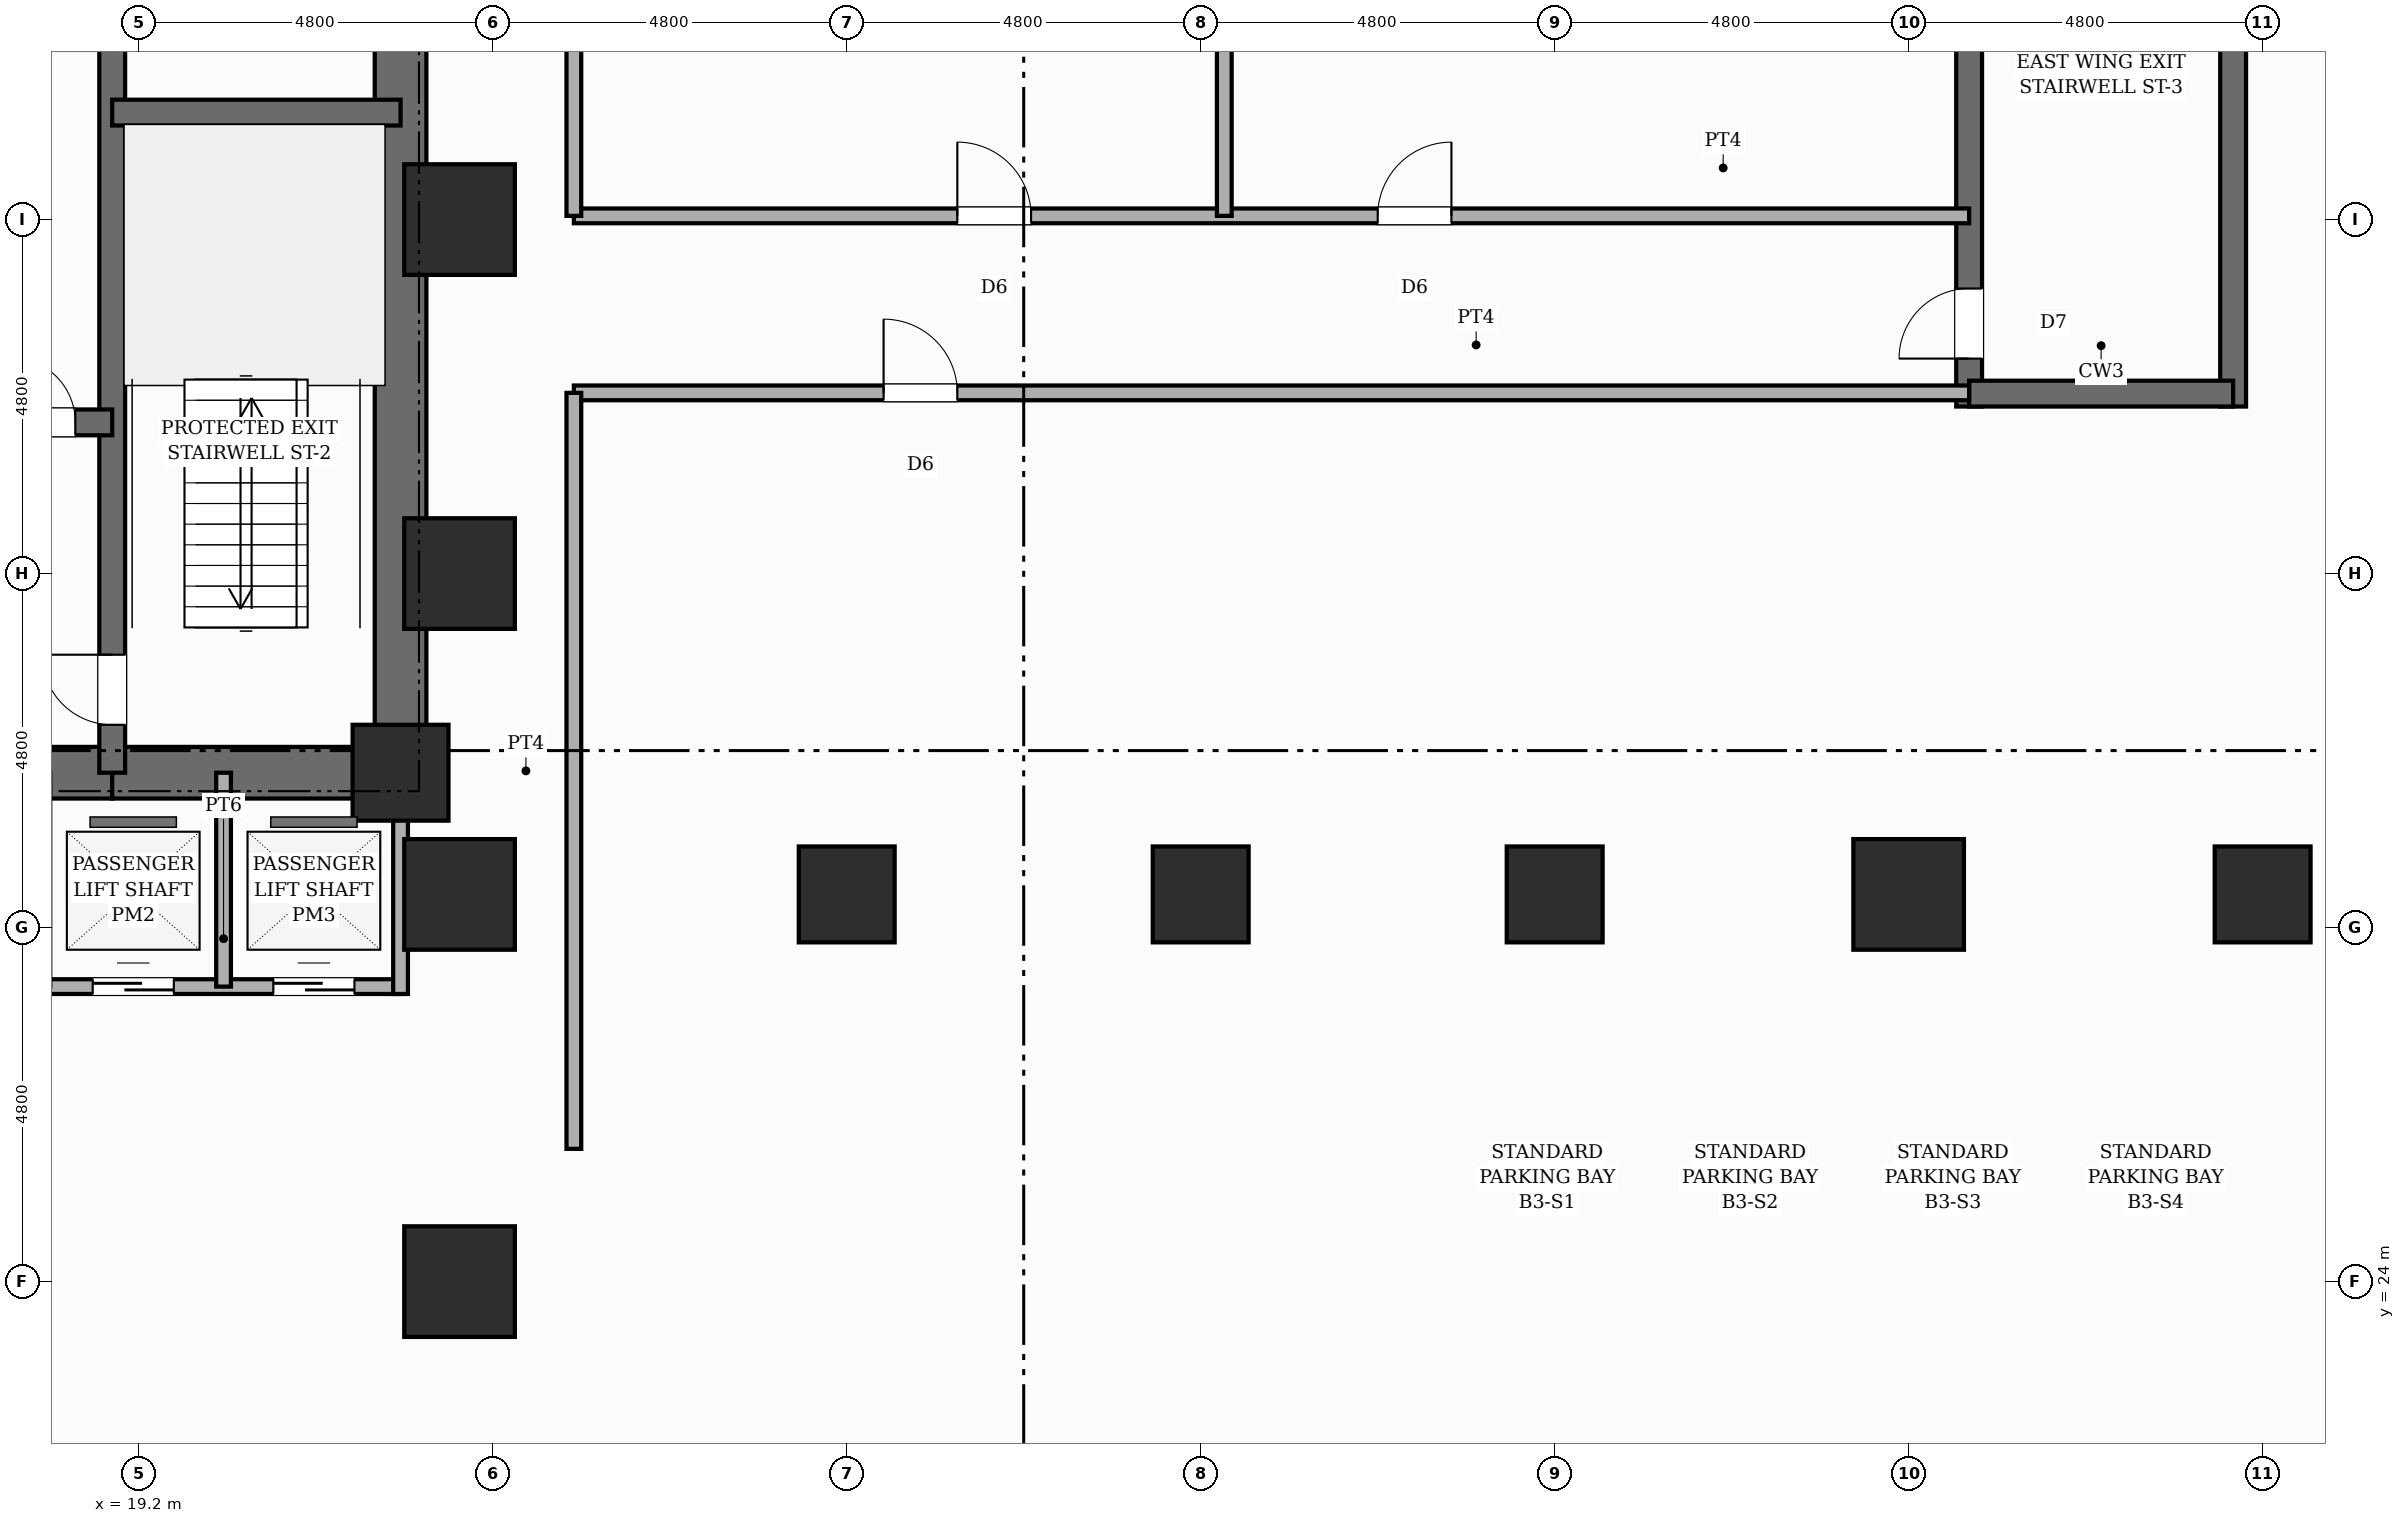
"""IFC4 building model, lengths in metres.
Left out: names, types, materials, properties, quantities, classifications, styles, units other than length and angle.
Written with IfcOpenShell. Run it as: python <this file> out.ifc"""

import sys

from ifc_helpers import new_model, si_unit, direction, frame, frame_2d, origin, origin_2d, place, context, subcontext, project, spatial, rectangle, extrude, element, fill, save


model = new_model("IFC4")
c1 = context("Model", 3, precision=1e-05, world=origin(), true_north=direction((0.0, 1.0)))
c2 = subcontext(c1, "Body", "Model", "MODEL_VIEW")
j1 = project(units=[si_unit("LENGTHUNIT", "METRE"), si_unit("PLANEANGLEUNIT", "RADIAN")], contexts=[c1])
p1 = place(None, origin())
s1 = spatial("IfcSite", under=j1, at=p1, CompositionType="ELEMENT")
p2 = place(p1, origin())
s2 = spatial("IfcBuilding", under=s1, at=p2, CompositionType="ELEMENT")
p3 = place(p2, frame((0.0, 0.0, -13.2)))
s3 = spatial("IfcBuildingStorey", under=s2, at=p3, CompositionType="ELEMENT", Elevation=-13.2)
p4 = place(p3, frame((22.75, 30.55, 0.0), z_axis=(0.0, 0.0, 1.0), x_axis=(0.0, 1.0, 0.0)))
e1 = element("IfcWall", 1, at=p4, inside=s3, PredefinedType="SHEAR", context=c2, shape_type="SweptSolid", body=[
    extrude(rectangle(XDim=15.6, YDim=0.7, at=frame_2d((7.8, 0.0))), origin(), (0.0, 0.0, 1.0), 4.4),
])
p5 = place(p4, frame((10.8, 0.0, 0.0)))
e2 = element("IfcOpeningElement", 2, at=p5, cuts=e1, PredefinedType="OPENING", context=c2, shape_type="SweptSolid", body=[
    extrude(rectangle(XDim=1.0, YDim=2.15, at=frame_2d((0.5, 1.075))), frame((0.0, 0.36, 0.0), z_axis=(0.0, -1.0, 0.0), x_axis=(1.0, 0.0, 0.0)), (0.0, 0.0, 1.0), 0.72),
])
p6 = place(p3, frame((9.96, 30.9, 0.0), z_axis=(0.0, 0.0, 1.0), x_axis=(1.0, 0.0, 0.0)))
e3 = element("IfcWall", 3, at=p6, inside=s3, PredefinedType="SHEAR", context=c2, shape_type="SweptSolid", body=[
    extrude(rectangle(XDim=8.88, YDim=0.7, at=frame_2d((4.44, 0.0))), origin(), (0.0, 0.0, 1.0), 4.4),
])
p7 = place(p6, frame((4.09, 0.0, 0.0)))
e4 = element("IfcOpeningElement", 4, at=p7, cuts=e3, PredefinedType="OPENING", context=c2, shape_type="SweptSolid", body=[
    extrude(rectangle(XDim=1.0, YDim=2.15, at=frame_2d((0.5, 1.075))), frame((0.0, 0.36, 0.0), z_axis=(0.0, -1.0, 0.0), x_axis=(1.0, 0.0, 0.0)), (0.0, 0.0, 1.0), 0.72),
])
p8 = place(p3, frame((18.84, 30.9, 0.0), z_axis=(0.0, 0.0, 1.0), x_axis=(1.0, 0.0, 0.0)))
e5 = element("IfcWall", 5, at=p8, inside=s3, PredefinedType="SHEAR", context=c2, shape_type="SweptSolid", body=[
    extrude(rectangle(XDim=3.91, YDim=0.7, at=frame_2d((1.955, 0.0))), origin(), (0.0, 0.0, 1.0), 4.4),
])
p9 = place(p3, frame((18.84, 30.9, 0.0), z_axis=(0.0, 0.0, 1.0), x_axis=(0.0, 1.0, 0.0)))
e6 = element("IfcWall", 6, at=p9, inside=s3, PredefinedType="SHEAR", context=c2, shape_type="SweptSolid", body=[
    extrude(rectangle(XDim=14.9, YDim=0.35, at=frame_2d((7.45, 0.0))), origin(), (0.0, 0.0, 1.0), 4.4),
])
p10 = place(p9, frame((0.65, 0.0, 0.0)))
e7 = element("IfcOpeningElement", 7, at=p10, cuts=e6, PredefinedType="OPENING", context=c2, shape_type="SweptSolid", body=[
    extrude(rectangle(XDim=0.95, YDim=2.1, at=frame_2d((0.475, 1.05))), frame((0.0, 0.185, 0.0), z_axis=(0.0, -1.0, 0.0), x_axis=(1.0, 0.0, 0.0)), (0.0, 0.0, 1.0), 0.37),
])
p11 = place(p9, frame((10.45, 0.0, 0.0)))
e8 = element("IfcOpeningElement", 8, at=p11, cuts=e6, PredefinedType="OPENING", context=c2, shape_type="SweptSolid", body=[
    extrude(rectangle(XDim=1.0, YDim=2.15, at=frame_2d((0.5, 1.075))), frame((0.0, 0.185, 0.0), z_axis=(0.0, -1.0, 0.0), x_axis=(1.0, 0.0, 0.0)), (0.0, 0.0, 1.0), 0.37),
])
p12 = place(p3, frame((18.84, 39.85, 0.0), z_axis=(0.0, 0.0, 1.0), x_axis=(1.0, 0.0, 0.0)))
e9 = element("IfcWall", 9, at=p12, inside=s3, PredefinedType="SHEAR", context=c2, shape_type="SweptSolid", body=[
    extrude(rectangle(XDim=3.91, YDim=0.35, at=frame_2d((1.955, 0.0))), origin(), (0.0, 0.0, 1.0), 4.4),
])
p13 = place(p3, frame((9.96, 35.65, 0.0), z_axis=(0.0, 0.0, 1.0), x_axis=(1.0, 0.0, 0.0)))
e10 = element("IfcWall", 10, at=p13, inside=s3, PredefinedType="SHEAR", context=c2, shape_type="SweptSolid", body=[
    extrude(rectangle(XDim=8.88, YDim=0.35, at=frame_2d((4.44, 0.0))), origin(), (0.0, 0.0, 1.0), 4.4),
])
p14 = place(p13, frame((0.84, 0.0, 0.0)))
e11 = element("IfcOpeningElement", 11, at=p14, cuts=e10, PredefinedType="OPENING", context=c2, shape_type="SweptSolid", body=[
    extrude(rectangle(XDim=1.1, YDim=2.15, at=frame_2d((0.55, 1.075))), frame((0.0, 0.185, 0.0), z_axis=(0.0, -1.0, 0.0), x_axis=(1.0, 0.0, 0.0)), (0.0, 0.0, 1.0), 0.37),
])
p15 = place(p13, frame((5.24, 0.0, 0.0)))
e12 = element("IfcOpeningElement", 12, at=p15, cuts=e10, PredefinedType="OPENING", context=c2, shape_type="SweptSolid", body=[
    extrude(rectangle(XDim=1.1, YDim=2.15, at=frame_2d((0.55, 1.075))), frame((0.0, 0.185, 0.0), z_axis=(0.0, -1.0, 0.0), x_axis=(1.0, 0.0, 0.0)), (0.0, 0.0, 1.0), 0.37),
])
p16 = place(p13, frame((7.5, 0.0, 0.0)))
e13 = element("IfcOpeningElement", 13, at=p16, cuts=e10, PredefinedType="OPENING", context=c2, shape_type="SweptSolid", body=[
    extrude(rectangle(XDim=0.88, YDim=2.1, at=frame_2d((0.44, 1.05))), frame((0.0, 0.185, 0.0), z_axis=(0.0, -1.0, 0.0), x_axis=(1.0, 0.0, 0.0)), (0.0, 0.0, 1.0), 0.37),
])
p17 = place(p3, frame((44.02, 35.865, 0.0), z_axis=(0.0, 0.0, 1.0), x_axis=(0.0, 1.0, 0.0)))
e14 = element("IfcWall", 14, at=p17, inside=s3, PredefinedType="SHEAR", context=c2, shape_type="SweptSolid", body=[
    extrude(rectangle(XDim=8.97, YDim=0.35, at=frame_2d((4.485, 0.0))), origin(), (0.0, 0.0, 1.0), 4.4),
])
p18 = place(p17, frame((0.65, 0.0, 0.0)))
e15 = element("IfcOpeningElement", 15, at=p18, cuts=e14, PredefinedType="OPENING", context=c2, shape_type="SweptSolid", body=[
    extrude(rectangle(XDim=0.95, YDim=2.1, at=frame_2d((0.475, 1.05))), frame((0.0, 0.185, 0.0), z_axis=(0.0, -1.0, 0.0), x_axis=(1.0, 0.0, 0.0)), (0.0, 0.0, 1.0), 0.37),
])
p19 = place(p3, frame((47.6, 35.865, 0.0), z_axis=(0.0, 0.0, 1.0), x_axis=(0.0, 1.0, 0.0)))
e16 = element("IfcWall", 16, at=p19, inside=s3, PredefinedType="SHEAR", context=c2, shape_type="SweptSolid", body=[
    extrude(rectangle(XDim=8.97, YDim=0.35, at=frame_2d((4.485, 0.0))), origin(), (0.0, 0.0, 1.0), 4.4),
])
p20 = place(p3, frame((44.02, 36.04, 0.0), z_axis=(0.0, 0.0, 1.0), x_axis=(1.0, 0.0, 0.0)))
e17 = element("IfcWall", 17, at=p20, inside=s3, PredefinedType="SHEAR", context=c2, shape_type="SweptSolid", body=[
    extrude(rectangle(XDim=3.58, YDim=0.35, at=frame_2d((1.79, 0.0))), origin(), (0.0, 0.0, 1.0), 4.4),
])
p21 = place(p3, frame((22.75, 30.9, 0.0), z_axis=(0.0, 0.0, 1.0), x_axis=(1.0, 0.0, 0.0)))
e18 = element("IfcColumn", 18, at=p21, inside=s3, PredefinedType="COLUMN", context=c2, shape_type="SweptSolid", body=[
    extrude(rectangle(XDim=1.3, YDim=1.3, at=origin_2d()), origin(), (0.0, 0.0, 1.0), 4.4),
])
for number, where, z_axis, x_axis in (
    (19, (23.55, 24.0, 0.0), (0.0, 0.0, 1.0), (1.0, 0.0, 0.0)),
    (20, (23.55, 29.25, 0.0), (0.0, 0.0, 1.0), (1.0, 0.0, 0.0)),
    (21, (23.55, 33.6, 0.0), (0.0, 0.0, 1.0), (1.0, 0.0, 0.0)),
    (22, (23.55, 38.4, 0.0), (0.0, 0.0, 1.0), (1.0, 0.0, 0.0)),
):
    element("IfcColumn", number, at=place(p3, frame(where, z_axis=z_axis, x_axis=x_axis)), inside=s3, PredefinedType="USERDEFINED", context=c2, shape_type="SweptSolid", body=[
        extrude(rectangle(XDim=1.5, YDim=1.5, at=origin_2d()), origin(), (0.0, 0.0, 1.0), 4.4),
    ])
for number, where, z_axis, x_axis in (
    (23, (28.8, 29.25, 0.0), (0.0, 0.0, 1.0), (1.0, 0.0, 0.0)),
    (24, (33.6, 29.25, 0.0), (0.0, 0.0, 1.0), (1.0, 0.0, 0.0)),
    (25, (38.4, 29.25, 0.0), (0.0, 0.0, 1.0), (1.0, 0.0, 0.0)),
):
    element("IfcColumn", number, at=place(p3, frame(where, z_axis=z_axis, x_axis=x_axis)), inside=s3, PredefinedType="COLUMN", context=c2, shape_type="SweptSolid", body=[
        extrude(rectangle(XDim=1.3, YDim=1.3, at=origin_2d()), origin(), (0.0, 0.0, 1.0), 4.4),
    ])
p22 = place(p3, frame((43.2, 29.25, 0.0), z_axis=(0.0, 0.0, 1.0), x_axis=(1.0, 0.0, 0.0)))
e26 = element("IfcColumn", 26, at=p22, inside=s3, PredefinedType="USERDEFINED", context=c2, shape_type="SweptSolid", body=[
    extrude(rectangle(XDim=1.5, YDim=1.5, at=origin_2d()), origin(), (0.0, 0.0, 1.0), 4.4),
])
p23 = place(p3, frame((48.0, 29.25, 0.0), z_axis=(0.0, 0.0, 1.0), x_axis=(1.0, 0.0, 0.0)))
e27 = element("IfcColumn", 27, at=p23, inside=s3, PredefinedType="COLUMN", context=c2, shape_type="SweptSolid", body=[
    extrude(rectangle(XDim=1.3, YDim=1.3, at=origin_2d()), origin(), (0.0, 0.0, 1.0), 4.4),
])
p24 = place(p3, frame((15.5, 28.0, 0.0), z_axis=(0.0, 0.0, 1.0), x_axis=(1.0, 0.0, 0.0)))
e28 = element("IfcWall", 28, at=p24, inside=s3, PredefinedType="POLYGONAL", context=c2, shape_type="SweptSolid", body=[
    extrude(rectangle(XDim=7.25, YDim=0.2, at=frame_2d((3.625, 0.0))), origin(), (0.0, 0.0, 1.0), 4.08),
])
p25 = place(p24, frame((0.625, 0.0, 0.0)))
e29 = element("IfcOpeningElement", 29, at=p25, cuts=e28, PredefinedType="OPENING", context=c2, shape_type="SweptSolid", body=[
    extrude(rectangle(XDim=1.1, YDim=2.15, at=frame_2d((0.55, 1.075))), frame((0.0, 0.11, 0.0), z_axis=(0.0, -1.0, 0.0), x_axis=(1.0, 0.0, 0.0)), (0.0, 0.0, 1.0), 0.22),
])
p26 = place(p24, frame((3.075, 0.0, 0.0)))
e30 = element("IfcOpeningElement", 30, at=p26, cuts=e28, PredefinedType="OPENING", context=c2, shape_type="SweptSolid", body=[
    extrude(rectangle(XDim=1.1, YDim=2.15, at=frame_2d((0.55, 1.075))), frame((0.0, 0.11, 0.0), z_axis=(0.0, -1.0, 0.0), x_axis=(1.0, 0.0, 0.0)), (0.0, 0.0, 1.0), 0.22),
])
p27 = place(p24, frame((5.525, 0.0, 0.0)))
e31 = element("IfcOpeningElement", 31, at=p27, cuts=e28, PredefinedType="OPENING", context=c2, shape_type="SweptSolid", body=[
    extrude(rectangle(XDim=1.1, YDim=2.15, at=frame_2d((0.55, 1.075))), frame((0.0, 0.11, 0.0), z_axis=(0.0, -1.0, 0.0), x_axis=(1.0, 0.0, 0.0)), (0.0, 0.0, 1.0), 0.22),
])
p28 = place(p3, frame((22.75, 27.9, 0.0), z_axis=(0.0, 0.0, 1.0), x_axis=(0.0, 1.0, 0.0)))
e32 = element("IfcWall", 32, at=p28, inside=s3, PredefinedType="POLYGONAL", context=c2, shape_type="SweptSolid", body=[
    extrude(rectangle(XDim=3.0, YDim=0.2, at=frame_2d((1.5, 0.0))), origin(), (0.0, 0.0, 1.0), 4.08),
])
p29 = place(p3, frame((20.35, 28.0, 0.0), z_axis=(0.0, 0.0, 1.0), x_axis=(0.0, 1.0, 0.0)))
e33 = element("IfcWall", 33, at=p29, inside=s3, PredefinedType="POLYGONAL", context=c2, shape_type="SweptSolid", body=[
    extrude(rectangle(XDim=2.9, YDim=0.2, at=frame_2d((1.45, 0.0))), origin(), (0.0, 0.0, 1.0), 4.08),
])
p30 = place(p3, frame((25.1, 36.05, 0.0), z_axis=(0.0, 0.0, 1.0), x_axis=(1.0, 0.0, 0.0)))
e34 = element("IfcWall", 34, at=p30, inside=s3, PredefinedType="PARTITIONING", context=c2, shape_type="SweptSolid", body=[
    extrude(rectangle(XDim=18.92, YDim=0.2, at=frame_2d((9.46, 0.0))), origin(), (0.0, 0.0, 1.0), 4.08),
])
p31 = place(p30, frame((4.2, 0.0, 0.0)))
e35 = element("IfcOpeningElement", 35, at=p31, cuts=e34, PredefinedType="OPENING", context=c2, shape_type="SweptSolid", body=[
    extrude(rectangle(XDim=1.0, YDim=2.15, at=frame_2d((0.5, 1.075))), frame((0.0, 0.11, 0.0), z_axis=(0.0, -1.0, 0.0), x_axis=(1.0, 0.0, 0.0)), (0.0, 0.0, 1.0), 0.22),
])
p32 = place(p3, frame((25.1, 38.45, 0.0), z_axis=(0.0, 0.0, 1.0), x_axis=(1.0, 0.0, 0.0)))
e36 = element("IfcWall", 36, at=p32, inside=s3, PredefinedType="PARTITIONING", context=c2, shape_type="SweptSolid", body=[
    extrude(rectangle(XDim=18.92, YDim=0.2, at=frame_2d((9.46, 0.0))), origin(), (0.0, 0.0, 1.0), 4.08),
])
p33 = place(p32, frame((5.2, 0.0, 0.0)))
e37 = element("IfcOpeningElement", 37, at=p33, cuts=e36, PredefinedType="OPENING", context=c2, shape_type="SweptSolid", body=[
    extrude(rectangle(XDim=1.0, YDim=2.15, at=frame_2d((0.5, 1.075))), frame((0.0, 0.11, 0.0), z_axis=(0.0, -1.0, 0.0), x_axis=(1.0, 0.0, 0.0)), (0.0, 0.0, 1.0), 0.22),
])
p34 = place(p32, frame((10.9, 0.0, 0.0)))
e38 = element("IfcOpeningElement", 38, at=p34, cuts=e36, PredefinedType="OPENING", context=c2, shape_type="SweptSolid", body=[
    extrude(rectangle(XDim=1.0, YDim=2.15, at=frame_2d((0.5, 1.075))), frame((0.0, 0.11, 0.0), z_axis=(0.0, -1.0, 0.0), x_axis=(1.0, 0.0, 0.0)), (0.0, 0.0, 1.0), 0.22),
])
p35 = place(p3, frame((25.1, 25.8, 0.0), z_axis=(0.0, 0.0, 1.0), x_axis=(0.0, 1.0, 0.0)))
e39 = element("IfcWall", 39, at=p35, inside=s3, PredefinedType="PARTITIONING", context=c2, shape_type="SweptSolid", body=[
    extrude(rectangle(XDim=10.25, YDim=0.2, at=frame_2d((5.125, 0.0))), origin(), (0.0, 0.0, 1.0), 4.08),
])
p36 = place(p3, frame((25.1, 38.45, 0.0), z_axis=(0.0, 0.0, 1.0), x_axis=(0.0, 1.0, 0.0)))
e40 = element("IfcWall", 40, at=p36, inside=s3, PredefinedType="PARTITIONING", context=c2, shape_type="SweptSolid", body=[
    extrude(rectangle(XDim=4.6, YDim=0.2, at=frame_2d((2.3, 0.0))), origin(), (0.0, 0.0, 1.0), 4.08),
])
p37 = place(p3, frame((33.92, 38.45, 0.0), z_axis=(0.0, 0.0, 1.0), x_axis=(0.0, 1.0, 0.0)))
e41 = element("IfcWall", 41, at=p37, inside=s3, PredefinedType="PARTITIONING", context=c2, shape_type="SweptSolid", body=[
    extrude(rectangle(XDim=8.95, YDim=0.2, at=frame_2d((4.475, 0.0))), origin(), (0.0, 0.0, 1.0), 3.28),
])
p38 = place(p10, origin())
e42 = element("IfcDoor", 42, at=p38, inside=s3, OperationType="SINGLE_SWING_RIGHT", PredefinedType="DOOR", context=c2, shape_type="SweptSolid", body=[
    extrude(rectangle(XDim=0.95, YDim=2.1, at=frame_2d((0.475, 1.05))), frame((0.0, 0.025, 0.0), z_axis=(0.0, -1.0, 0.0), x_axis=(1.0, 0.0, 0.0)), (0.0, 0.0, 1.0), 0.05),
])
fill(e7, e42)
p39 = place(p18, origin())
e43 = element("IfcDoor", 43, at=p39, inside=s3, OperationType="SINGLE_SWING_LEFT", PredefinedType="DOOR", context=c2, shape_type="SweptSolid", body=[
    extrude(rectangle(XDim=0.95, YDim=2.1, at=frame_2d((0.475, 1.05))), frame((0.0, 0.025, 0.0), z_axis=(0.0, -1.0, 0.0), x_axis=(1.0, 0.0, 0.0)), (0.0, 0.0, 1.0), 0.05),
])
fill(e15, e43)
p40 = place(p16, origin())
e44 = element("IfcDoor", 44, at=p40, inside=s3, OperationType="SINGLE_SWING_LEFT", PredefinedType="DOOR", context=c2, shape_type="SweptSolid", body=[
    extrude(rectangle(XDim=0.88, YDim=2.1, at=frame_2d((0.44, 1.05))), frame((0.0, 0.025, 0.0), z_axis=(0.0, -1.0, 0.0), x_axis=(1.0, 0.0, 0.0)), (0.0, 0.0, 1.0), 0.05),
])
fill(e13, e44)
p41 = place(p26, origin())
e45 = element("IfcDoor", 45, at=p41, inside=s3, OperationType="SLIDING_TO_LEFT", PredefinedType="DOOR", context=c2, shape_type="SweptSolid", body=[
    extrude(rectangle(XDim=1.1, YDim=2.15, at=frame_2d((0.55, 1.075))), frame((0.0, 0.025, 0.0), z_axis=(0.0, -1.0, 0.0), x_axis=(1.0, 0.0, 0.0)), (0.0, 0.0, 1.0), 0.05),
])
fill(e30, e45)
p42 = place(p27, origin())
e46 = element("IfcDoor", 46, at=p42, inside=s3, OperationType="SLIDING_TO_RIGHT", PredefinedType="DOOR", context=c2, shape_type="SweptSolid", body=[
    extrude(rectangle(XDim=1.1, YDim=2.15, at=frame_2d((0.55, 1.075))), frame((0.0, 0.025, 0.0), z_axis=(0.0, -1.0, 0.0), x_axis=(1.0, 0.0, 0.0)), (0.0, 0.0, 1.0), 0.05),
])
fill(e31, e46)
p43 = place(p31, origin())
e47 = element("IfcDoor", 47, at=p43, inside=s3, OperationType="SINGLE_SWING_LEFT", PredefinedType="DOOR", context=c2, shape_type="SweptSolid", body=[
    extrude(rectangle(XDim=1.0, YDim=2.15, at=frame_2d((0.5, 1.075))), frame((0.0, 0.025, 0.0), z_axis=(0.0, -1.0, 0.0), x_axis=(1.0, 0.0, 0.0)), (0.0, 0.0, 1.0), 0.05),
])
fill(e35, e47)
p44 = place(p33, origin())
e48 = element("IfcDoor", 48, at=p44, inside=s3, OperationType="SINGLE_SWING_LEFT", PredefinedType="DOOR", context=c2, shape_type="SweptSolid", body=[
    extrude(rectangle(XDim=1.0, YDim=2.15, at=frame_2d((0.5, 1.075))), frame((0.0, 0.025, 0.0), z_axis=(0.0, -1.0, 0.0), x_axis=(1.0, 0.0, 0.0)), (0.0, 0.0, 1.0), 0.05),
])
fill(e37, e48)
p45 = place(p34, origin())
e49 = element("IfcDoor", 49, at=p45, inside=s3, OperationType="SINGLE_SWING_RIGHT", PredefinedType="DOOR", context=c2, shape_type="SweptSolid", body=[
    extrude(rectangle(XDim=1.0, YDim=2.15, at=frame_2d((0.5, 1.075))), frame((0.0, 0.025, 0.0), z_axis=(0.0, -1.0, 0.0), x_axis=(1.0, 0.0, 0.0)), (0.0, 0.0, 1.0), 0.05),
])
fill(e38, e49)
save(model, sys.argv[1])
